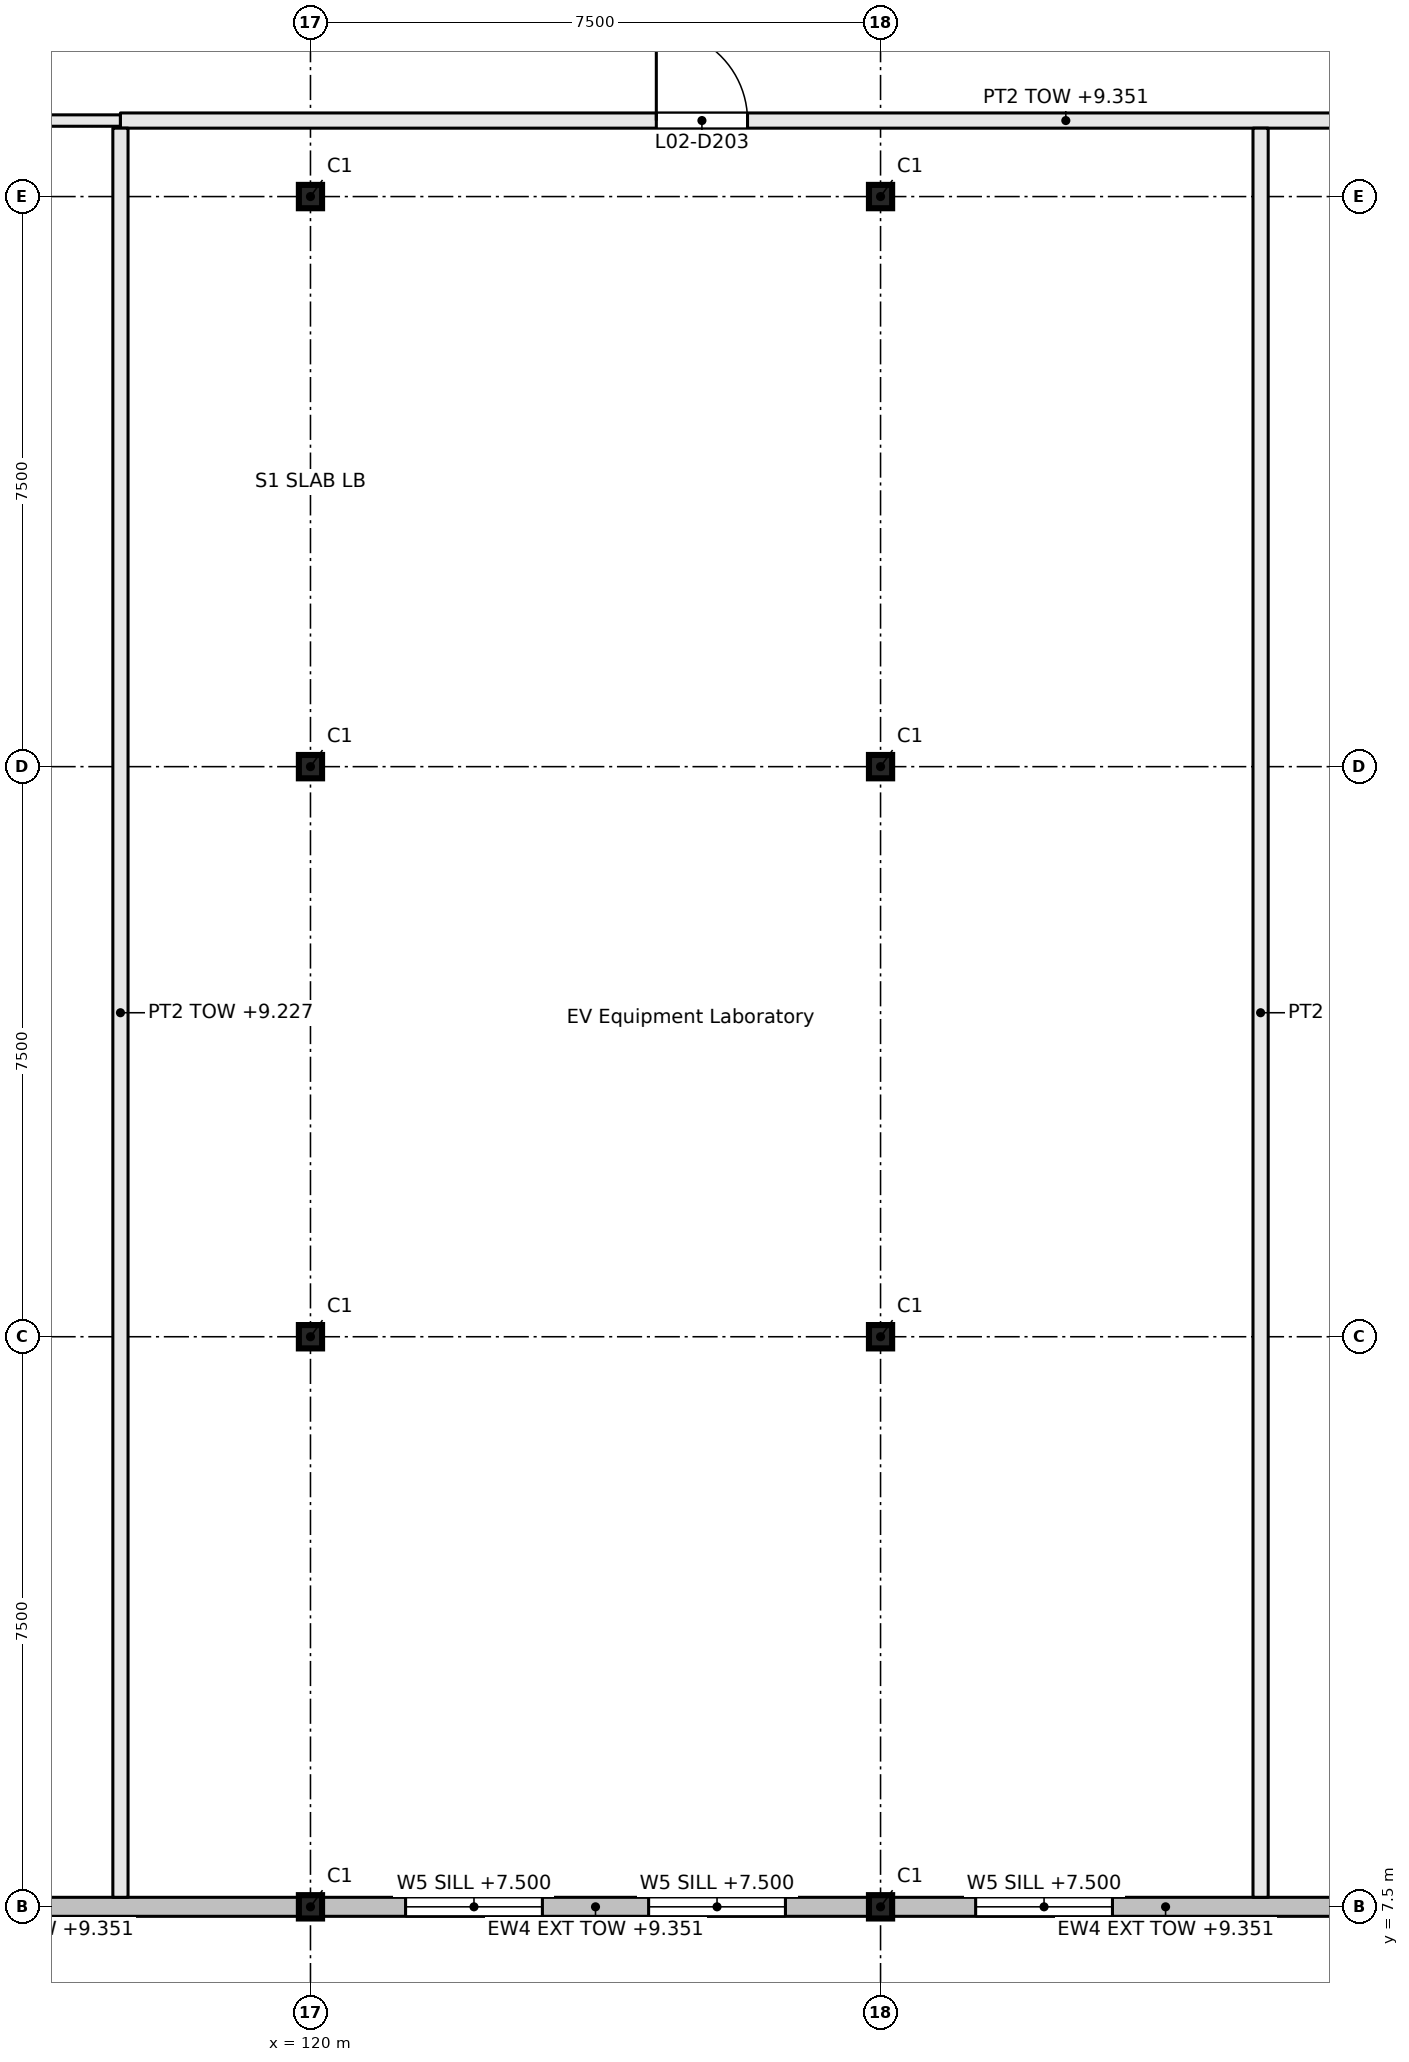
"""IFC4 building model, lengths in metres.
Left out: names, types, materials, properties, quantities, classifications, styles, units other than length and angle.
Written with IfcOpenShell. Run it as: python <this file> out.ifc"""

import sys

from ifc_helpers import new_model, si_unit, direction, frame, frame_2d, origin, origin_2d, place, context, subcontext, project, spatial, rectangle, i_section, extrude, element, fill, save


model = new_model("IFC4")
c1 = context("Model", 3, precision=1e-05, world=origin(), true_north=direction((0.0, 1.0)))
c2 = subcontext(c1, "Body", "Model", "MODEL_VIEW")
j1 = project(units=[si_unit("LENGTHUNIT", "METRE"), si_unit("PLANEANGLEUNIT", "RADIAN")], contexts=[c1])
p1 = place(None, origin())
s1 = spatial("IfcSite", under=j1, at=p1, CompositionType="ELEMENT")
p2 = place(p1, origin())
s2 = spatial("IfcBuilding", under=s1, at=p2, CompositionType="ELEMENT")
p3 = place(p2, frame((0.0, 0.0, 6.6)))
s3 = spatial("IfcBuildingStorey", under=s2, at=p3, CompositionType="ELEMENT", Elevation=6.6)
for number, where, z_axis, x_axis in (
    (1, (120.0, 7.5, 0.0), (0.0, 0.0, 1.0), (1.0, 0.0, 0.0)),
    (2, (120.0, 15.0, 0.0), (0.0, 0.0, 1.0), (1.0, 0.0, 0.0)),
    (3, (120.0, 22.5, 0.0), (0.0, 0.0, 1.0), (1.0, 0.0, 0.0)),
    (4, (120.0, 30.0, 0.0), (0.0, 0.0, 1.0), (1.0, 0.0, 0.0)),
    (5, (127.5, 7.5, 0.0), (0.0, 0.0, 1.0), (1.0, 0.0, 0.0)),
    (6, (127.5, 15.0, 0.0), (0.0, 0.0, 1.0), (1.0, 0.0, 0.0)),
    (7, (127.5, 22.5, 0.0), (0.0, 0.0, 1.0), (1.0, 0.0, 0.0)),
    (8, (127.5, 30.0, 0.0), (0.0, 0.0, 1.0), (1.0, 0.0, 0.0)),
):
    element("IfcColumn", number, at=place(p3, frame(where, z_axis=z_axis, x_axis=x_axis)), inside=s3, PredefinedType="COLUMN", context=c2, shape_type="SweptSolid", body=[
        extrude(i_section(OverallWidth=0.305, OverallDepth=0.307, WebThickness=0.01, FlangeThickness=0.015, FilletRadius=0.015, at=origin_2d()), origin(), (0.0, 0.0, 1.0), 3.3),
    ])
p4 = place(p3, frame((97.625, 31.0, 0.0), z_axis=(0.0, 0.0, 1.0), x_axis=(1.0, 0.0, 0.0)))
e9 = element("IfcWall", 9, at=p4, inside=s3, PredefinedType="PARTITIONING", context=c2, shape_type="SweptSolid", body=[
    extrude(rectangle(XDim=19.875, YDim=0.15, at=frame_2d((9.938, 0.0))), origin(), (0.0, 0.0, 1.0), 2.751),
])
p5 = place(p4, frame((9.175, 0.0, 0.0)))
e10 = element("IfcOpeningElement", 10, at=p5, cuts=e9, PredefinedType="OPENING", context=c2, shape_type="SweptSolid", body=[
    extrude(rectangle(XDim=1.2, YDim=2.1, at=frame_2d((0.6, 1.05))), frame((0.0, 0.085, 0.0), z_axis=(0.0, -1.0, 0.0), x_axis=(1.0, 0.0, 0.0)), (0.0, 0.0, 1.0), 0.17),
])
p6 = place(p3, frame((117.5, 31.0, 0.0), z_axis=(0.0, 0.0, 1.0), x_axis=(1.0, 0.0, 0.0)))
e11 = element("IfcWall", 11, at=p6, inside=s3, PredefinedType="PARTITIONING", context=c2, shape_type="SweptSolid", body=[
    extrude(rectangle(XDim=24.875, YDim=0.2, at=frame_2d((12.438, 0.0))), origin(), (0.0, 0.0, 1.0), 2.751),
])
p7 = place(p6, frame((7.05, 0.0, 0.0)))
e12 = element("IfcOpeningElement", 12, at=p7, cuts=e11, PredefinedType="OPENING", context=c2, shape_type="SweptSolid", body=[
    extrude(rectangle(XDim=1.2, YDim=2.1, at=frame_2d((0.6, 1.05))), frame((0.0, 0.11, 0.0), z_axis=(0.0, -1.0, 0.0), x_axis=(1.0, 0.0, 0.0)), (0.0, 0.0, 1.0), 0.22),
])
p8 = place(p6, frame((19.275, 0.0, 0.0)))
e13 = element("IfcOpeningElement", 13, at=p8, cuts=e11, PredefinedType="OPENING", context=c2, shape_type="SweptSolid", body=[
    extrude(rectangle(XDim=1.2, YDim=2.1, at=frame_2d((0.6, 1.05))), frame((0.0, 0.11, 0.0), z_axis=(0.0, -1.0, 0.0), x_axis=(1.0, 0.0, 0.0)), (0.0, 0.0, 1.0), 0.22),
])
for number, where, z_axis, x_axis in (
    (14, (117.5, 7.625, 0.0), (0.0, 0.0, 1.0), (0.0, 1.0, 0.0)),
    (15, (132.5, 7.625, 0.0), (0.0, 0.0, 1.0), (0.0, 1.0, 0.0)),
):
    element("IfcWall", number, at=place(p3, frame(where, z_axis=z_axis, x_axis=x_axis)), inside=s3, PredefinedType="PARTITIONING", context=c2, shape_type="SweptSolid", body=[
        extrude(rectangle(XDim=23.275, YDim=0.2, at=frame_2d((11.637, 0.0))), origin(), (0.0, 0.0, 1.0), 2.627),
    ])
p9 = place(p3, frame((112.654, 7.5, 0.0), z_axis=(0.0, 0.0, 1.0), x_axis=(1.0, 0.0, 0.0)))
e16 = element("IfcWall", 16, at=p9, inside=s3, PredefinedType="SOLIDWALL", context=c2, shape_type="SweptSolid", body=[
    extrude(rectangle(XDim=7.193, YDim=0.25, at=frame_2d((3.596, 0.0))), origin(), (0.0, 0.0, 1.0), 2.751),
])
p10 = place(p9, frame((0.498, 0.0, 0.9)))
e17 = element("IfcOpeningElement", 17, at=p10, cuts=e16, PredefinedType="OPENING", context=c2, shape_type="SweptSolid", body=[
    extrude(rectangle(XDim=3.0, YDim=1.5, at=frame_2d((1.5, 0.75))), frame((0.0, 0.135, 0.0), z_axis=(0.0, -1.0, 0.0), x_axis=(1.0, 0.0, 0.0)), (0.0, 0.0, 1.0), 0.27),
])
p11 = place(p3, frame((120.154, 7.5, 0.0), z_axis=(0.0, 0.0, 1.0), x_axis=(1.0, 0.0, 0.0)))
e18 = element("IfcWall", 18, at=p11, inside=s3, PredefinedType="SOLIDWALL", context=c2, shape_type="SweptSolid", body=[
    extrude(rectangle(XDim=7.193, YDim=0.25, at=frame_2d((3.596, 0.0))), origin(), (0.0, 0.0, 1.0), 2.751),
])
p12 = place(p11, frame((1.098, 0.0, 0.9)))
e19 = element("IfcOpeningElement", 19, at=p12, cuts=e18, PredefinedType="OPENING", context=c2, shape_type="SweptSolid", body=[
    extrude(rectangle(XDim=1.8, YDim=1.5, at=frame_2d((0.9, 0.75))), frame((0.0, 0.135, 0.0), z_axis=(0.0, -1.0, 0.0), x_axis=(1.0, 0.0, 0.0)), (0.0, 0.0, 1.0), 0.27),
])
p13 = place(p11, frame((4.295, 0.0, 0.9)))
e20 = element("IfcOpeningElement", 20, at=p13, cuts=e18, PredefinedType="OPENING", context=c2, shape_type="SweptSolid", body=[
    extrude(rectangle(XDim=1.8, YDim=1.5, at=frame_2d((0.9, 0.75))), frame((0.0, 0.135, 0.0), z_axis=(0.0, -1.0, 0.0), x_axis=(1.0, 0.0, 0.0)), (0.0, 0.0, 1.0), 0.27),
])
p14 = place(p3, frame((127.654, 7.5, 0.0), z_axis=(0.0, 0.0, 1.0), x_axis=(1.0, 0.0, 0.0)))
e21 = element("IfcWall", 21, at=p14, inside=s3, PredefinedType="SOLIDWALL", context=c2, shape_type="SweptSolid", body=[
    extrude(rectangle(XDim=7.193, YDim=0.25, at=frame_2d((3.596, 0.0))), origin(), (0.0, 0.0, 1.0), 2.751),
])
p15 = place(p14, frame((1.098, 0.0, 0.9)))
e22 = element("IfcOpeningElement", 22, at=p15, cuts=e21, PredefinedType="OPENING", context=c2, shape_type="SweptSolid", body=[
    extrude(rectangle(XDim=1.8, YDim=1.5, at=frame_2d((0.9, 0.75))), frame((0.0, 0.135, 0.0), z_axis=(0.0, -1.0, 0.0), x_axis=(1.0, 0.0, 0.0)), (0.0, 0.0, 1.0), 0.27),
])
p16 = place(p7, origin())
e23 = element("IfcDoor", 23, at=p16, inside=s3, OperationType="DOUBLE_DOOR_SINGLE_SWING", PredefinedType="DOOR", context=c2, shape_type="SweptSolid", body=[
    extrude(rectangle(XDim=1.2, YDim=2.1, at=frame_2d((0.6, 1.05))), frame((0.0, 0.025, 0.0), z_axis=(0.0, -1.0, 0.0), x_axis=(1.0, 0.0, 0.0)), (0.0, 0.0, 1.0), 0.05),
])
fill(e12, e23)
p17 = place(p12, origin())
e24 = element("IfcWindow", 24, at=p17, inside=s3, PartitioningType="SINGLE_PANEL", PredefinedType="WINDOW", context=c2, shape_type="SweptSolid", body=[
    extrude(rectangle(XDim=1.8, YDim=1.5, at=frame_2d((0.9, 0.75))), frame((0.0, 0.03, 0.0), z_axis=(0.0, -1.0, 0.0), x_axis=(1.0, 0.0, 0.0)), (0.0, 0.0, 1.0), 0.06),
])
fill(e19, e24)
p18 = place(p13, origin())
e25 = element("IfcWindow", 25, at=p18, inside=s3, PartitioningType="SINGLE_PANEL", PredefinedType="WINDOW", context=c2, shape_type="SweptSolid", body=[
    extrude(rectangle(XDim=1.8, YDim=1.5, at=frame_2d((0.9, 0.75))), frame((0.0, 0.03, 0.0), z_axis=(0.0, -1.0, 0.0), x_axis=(1.0, 0.0, 0.0)), (0.0, 0.0, 1.0), 0.06),
])
fill(e20, e25)
p19 = place(p15, origin())
e26 = element("IfcWindow", 26, at=p19, inside=s3, PartitioningType="SINGLE_PANEL", PredefinedType="WINDOW", context=c2, shape_type="SweptSolid", body=[
    extrude(rectangle(XDim=1.8, YDim=1.5, at=frame_2d((0.9, 0.75))), frame((0.0, 0.03, 0.0), z_axis=(0.0, -1.0, 0.0), x_axis=(1.0, 0.0, 0.0)), (0.0, 0.0, 1.0), 0.06),
])
fill(e22, e26)
save(model, sys.argv[1])
